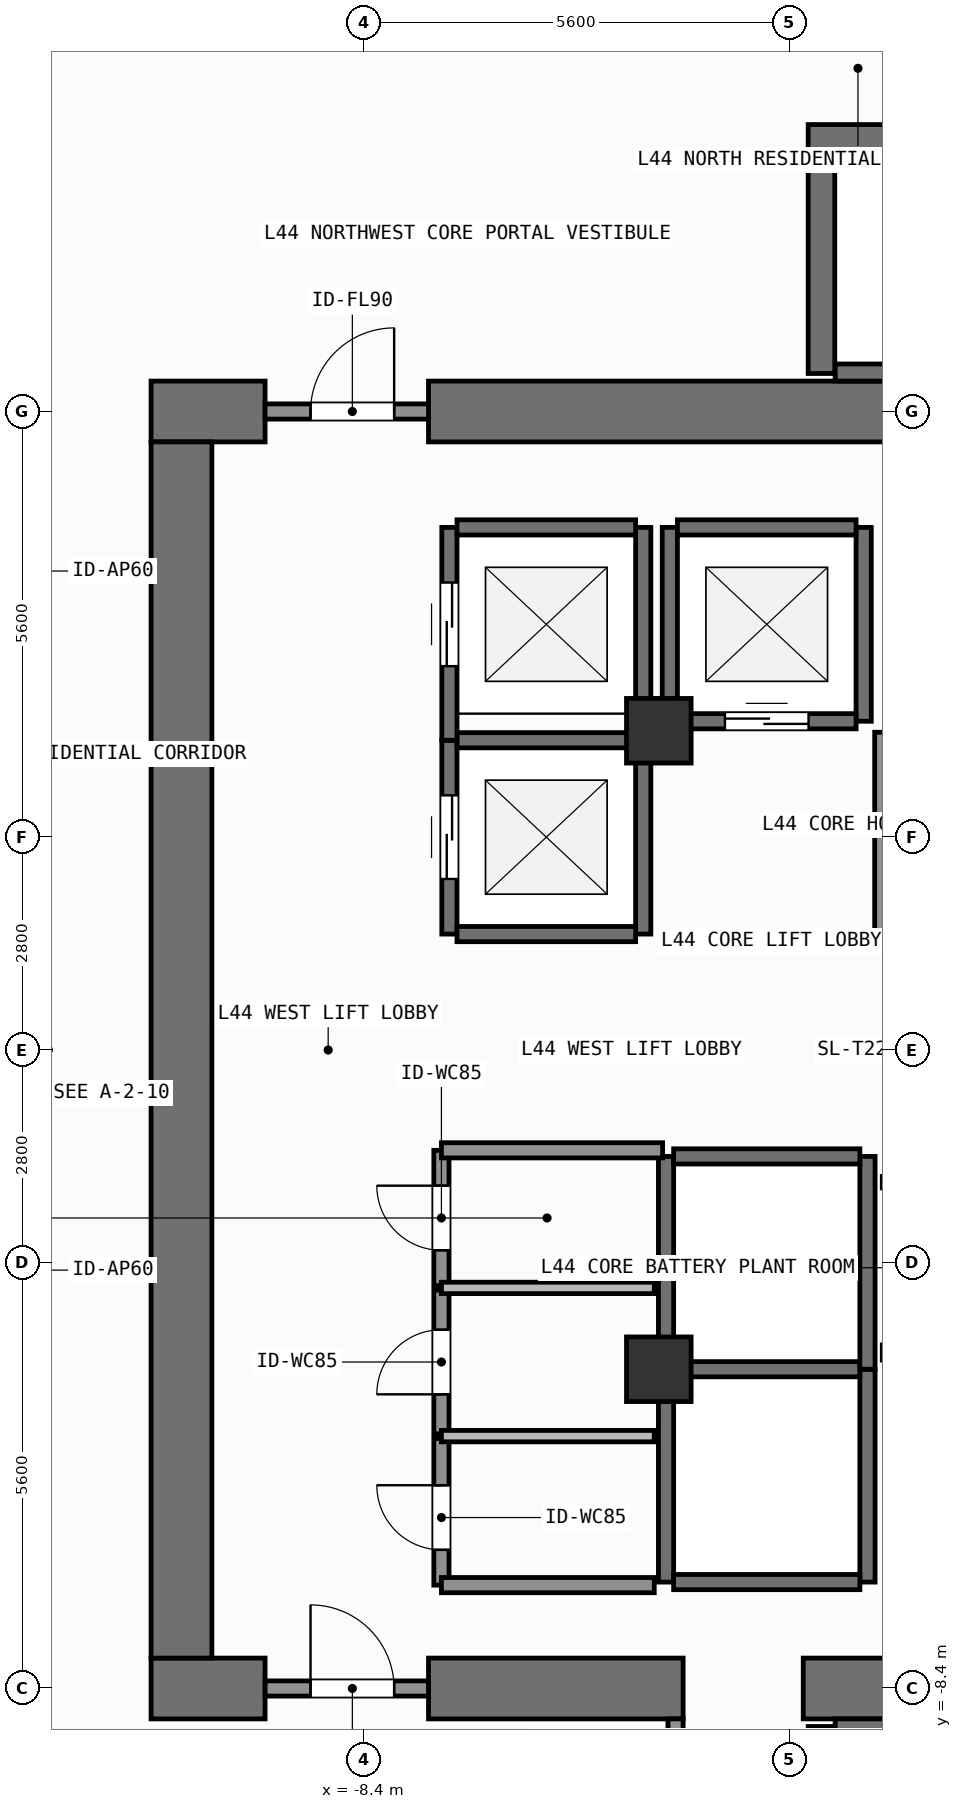
"""IFC4 building model, lengths in metres.
Left out: names, types, materials, properties, quantities, classifications, styles, units other than length and angle.
Written with IfcOpenShell. Run it as: python <this file> out.ifc"""

import sys

from ifc_helpers import new_model, si_unit, direction, frame, frame_2d, origin, origin_2d, place, context, subcontext, project, spatial, rectangle, extrude, element, fill, save


model = new_model("IFC4")
c1 = context("Model", 3, precision=1e-05, world=origin(), true_north=direction((0.0, 1.0)))
c2 = subcontext(c1, "Body", "Model", "MODEL_VIEW")
j1 = project(units=[si_unit("LENGTHUNIT", "METRE"), si_unit("PLANEANGLEUNIT", "RADIAN")], contexts=[c1])
p1 = place(None, origin())
s1 = spatial("IfcSite", under=j1, at=p1, CompositionType="ELEMENT")
p2 = place(p1, origin())
s2 = spatial("IfcBuilding", under=s1, at=p2, CompositionType="ELEMENT")
p3 = place(p2, frame((0.0, 0.0, 179.7)))
s3 = spatial("IfcBuildingStorey", under=s2, at=p3, CompositionType="ELEMENT", Elevation=179.7)
p4 = place(p3, frame((-11.2, -8.4, 0.0), z_axis=(0.0, 0.0, 1.0), x_axis=(1.0, 0.0, 0.0)))
e1 = element("IfcWall", 1, at=p4, inside=s3, PredefinedType="SHEAR", context=c2, shape_type="SweptSolid", body=[
    extrude(rectangle(XDim=1.5, YDim=0.8, at=frame_2d((0.75, 0.0))), origin(), (0.0, 0.0, 1.0), 3.9),
])
p5 = place(p3, frame((-7.55, -8.4, 0.0), z_axis=(0.0, 0.0, 1.0), x_axis=(1.0, 0.0, 0.0)))
e2 = element("IfcWall", 2, at=p5, inside=s3, PredefinedType="SHEAR", context=c2, shape_type="SweptSolid", body=[
    extrude(rectangle(XDim=3.35, YDim=0.8, at=frame_2d((1.675, 0.0))), origin(), (0.0, 0.0, 1.0), 3.9),
])
p6 = place(p3, frame((-2.62, -8.4, 0.0), z_axis=(0.0, 0.0, 1.0), x_axis=(1.0, 0.0, 0.0)))
e3 = element("IfcWall", 3, at=p6, inside=s3, PredefinedType="SHEAR", context=c2, shape_type="SweptSolid", body=[
    extrude(rectangle(XDim=7.27, YDim=0.8, at=frame_2d((3.635, 0.0))), origin(), (0.0, 0.0, 1.0), 3.9),
])
p7 = place(p3, frame((-11.2, 8.4, 0.0), z_axis=(0.0, 0.0, 1.0), x_axis=(1.0, 0.0, 0.0)))
e4 = element("IfcWall", 4, at=p7, inside=s3, PredefinedType="SHEAR", context=c2, shape_type="SweptSolid", body=[
    extrude(rectangle(XDim=1.5, YDim=0.8, at=frame_2d((0.75, 0.0))), origin(), (0.0, 0.0, 1.0), 3.9),
])
p8 = place(p3, frame((-7.55, 8.4, 0.0), z_axis=(0.0, 0.0, 1.0), x_axis=(1.0, 0.0, 0.0)))
e5 = element("IfcWall", 5, at=p8, inside=s3, PredefinedType="SHEAR", context=c2, shape_type="SweptSolid", body=[
    extrude(rectangle(XDim=16.35, YDim=0.8, at=frame_2d((8.175, 0.0))), origin(), (0.0, 0.0, 1.0), 3.9),
])
p9 = place(p3, frame((-10.8, -8.0, 0.0), z_axis=(0.0, 0.0, 1.0), x_axis=(0.0, 1.0, 0.0)))
e6 = element("IfcWall", 6, at=p9, inside=s3, PredefinedType="SHEAR", context=c2, shape_type="SweptSolid", body=[
    extrude(rectangle(XDim=16.0, YDim=0.8, at=frame_2d((8.0, 0.0))), origin(), (0.0, 0.0, 1.0), 3.9),
])
p10 = place(p3, frame((-2.2, -8.913, 0.0), z_axis=(0.0, 0.0, 1.0), x_axis=(1.0, 0.0, 0.0)))
e7 = element("IfcWall", 7, at=p10, inside=s3, PredefinedType="SHEAR", context=c2, shape_type="SweptSolid", body=[
    extrude(rectangle(XDim=6.6, YDim=0.225, at=frame_2d((3.3, 0.0))), origin(), (0.0, 0.0, 1.0), 3.9),
])
p11 = place(p3, frame((-2.38, -11.825, 0.0), z_axis=(0.0, 0.0, 1.0), x_axis=(0.0, 1.0, 0.0)))
e8 = element("IfcWall", 8, at=p11, inside=s3, PredefinedType="SHEAR", context=c2, shape_type="SweptSolid", body=[
    extrude(rectangle(XDim=2.925, YDim=0.35, at=frame_2d((1.462, 0.0))), origin(), (0.0, 0.0, 1.0), 3.9),
])
p12 = place(p3, frame((-2.555, 12.0, 0.0), z_axis=(0.0, 0.0, 1.0), x_axis=(1.0, 0.0, 0.0)))
e9 = element("IfcWall", 9, at=p12, inside=s3, PredefinedType="SHEAR", context=c2, shape_type="SweptSolid", body=[
    extrude(rectangle(XDim=7.31, YDim=0.35, at=frame_2d((3.655, 0.0))), origin(), (0.0, 0.0, 1.0), 3.9),
])
p13 = place(p3, frame((-2.2, 8.913, 0.0), z_axis=(0.0, 0.0, 1.0), x_axis=(1.0, 0.0, 0.0)))
e10 = element("IfcWall", 10, at=p13, inside=s3, PredefinedType="SHEAR", context=c2, shape_type="SweptSolid", body=[
    extrude(rectangle(XDim=6.6, YDim=0.225, at=frame_2d((3.3, 0.0))), origin(), (0.0, 0.0, 1.0), 3.9),
])
p14 = place(p3, frame((-2.38, 8.9, 0.0), z_axis=(0.0, 0.0, 1.0), x_axis=(0.0, 1.0, 0.0)))
e11 = element("IfcWall", 11, at=p14, inside=s3, PredefinedType="SHEAR", context=c2, shape_type="SweptSolid", body=[
    extrude(rectangle(XDim=2.925, YDim=0.35, at=frame_2d((1.462, 0.0))), origin(), (0.0, 0.0, 1.0), 3.9),
])
for number, where, z_axis, x_axis in (
    (12, (-4.52, -4.2, 0.0), (0.0, 0.0, 1.0), (1.0, 0.0, 0.0)),
    (13, (-4.52, 4.2, 0.0), (0.0, 0.0, 1.0), (1.0, 0.0, 0.0)),
):
    element("IfcColumn", number, at=place(p3, frame(where, z_axis=z_axis, x_axis=x_axis)), inside=s3, PredefinedType="COLUMN", context=c2, shape_type="SweptSolid", body=[
        extrude(rectangle(XDim=0.85, YDim=0.85, at=origin_2d()), origin(), (0.0, 0.0, 1.0), 3.9),
    ])
p15 = place(p3, frame((-7.275, 1.525, 0.0), z_axis=(0.0, 0.0, 1.0), x_axis=(0.0, 1.0, 0.0)))
e14 = element("IfcWall", 14, at=p15, inside=s3, PredefinedType="SHEAR", context=c2, shape_type="SweptSolid", body=[
    extrude(rectangle(XDim=2.55, YDim=0.2, at=frame_2d((1.275, 0.0))), origin(), (0.0, 0.0, 1.0), 3.68),
])
p16 = place(p15, frame((0.725, 0.0, 0.0)))
e15 = element("IfcOpeningElement", 15, at=p16, cuts=e14, PredefinedType="OPENING", context=c2, shape_type="SweptSolid", body=[
    extrude(rectangle(XDim=1.1, YDim=2.2, at=frame_2d((0.55, 1.1))), frame((0.0, 0.11, 0.0), z_axis=(0.0, -1.0, 0.0), x_axis=(1.0, 0.0, 0.0)), (0.0, 0.0, 1.0), 0.22),
])
p17 = place(p3, frame((-4.725, 1.525, 0.0), z_axis=(0.0, 0.0, 1.0), x_axis=(0.0, 1.0, 0.0)))
e16 = element("IfcWall", 16, at=p17, inside=s3, PredefinedType="SHEAR", context=c2, shape_type="SweptSolid", body=[
    extrude(rectangle(XDim=2.55, YDim=0.2, at=frame_2d((1.275, 0.0))), origin(), (0.0, 0.0, 1.0), 3.68),
])
for number, where, z_axis, x_axis in (
    (17, (-7.175, 1.525, 0.0), (0.0, 0.0, 1.0), (1.0, 0.0, 0.0)),
    (18, (-7.175, 4.075, 0.0), (0.0, 0.0, 1.0), (1.0, 0.0, 0.0)),
):
    element("IfcWall", number, at=place(p3, frame(where, z_axis=z_axis, x_axis=x_axis)), inside=s3, PredefinedType="SHEAR", context=c2, shape_type="SweptSolid", body=[
        extrude(rectangle(XDim=2.35, YDim=0.2, at=frame_2d((1.175, 0.0))), origin(), (0.0, 0.0, 1.0), 3.68),
    ])
p18 = place(p3, frame((-7.275, 4.075, 0.0), z_axis=(0.0, 0.0, 1.0), x_axis=(0.0, 1.0, 0.0)))
e19 = element("IfcWall", 19, at=p18, inside=s3, PredefinedType="SHEAR", context=c2, shape_type="SweptSolid", body=[
    extrude(rectangle(XDim=2.8, YDim=0.2, at=frame_2d((1.4, 0.0))), origin(), (0.0, 0.0, 1.0), 3.68),
])
p19 = place(p18, frame((0.975, 0.0, 0.0)))
e20 = element("IfcOpeningElement", 20, at=p19, cuts=e19, PredefinedType="OPENING", context=c2, shape_type="SweptSolid", body=[
    extrude(rectangle(XDim=1.1, YDim=2.2, at=frame_2d((0.55, 1.1))), frame((0.0, 0.11, 0.0), z_axis=(0.0, -1.0, 0.0), x_axis=(1.0, 0.0, 0.0)), (0.0, 0.0, 1.0), 0.22),
])
p20 = place(p3, frame((-4.725, 4.075, 0.0), z_axis=(0.0, 0.0, 1.0), x_axis=(0.0, 1.0, 0.0)))
e21 = element("IfcWall", 21, at=p20, inside=s3, PredefinedType="SHEAR", context=c2, shape_type="SweptSolid", body=[
    extrude(rectangle(XDim=2.8, YDim=0.2, at=frame_2d((1.4, 0.0))), origin(), (0.0, 0.0, 1.0), 3.68),
])
p21 = place(p3, frame((-7.175, 6.875, 0.0), z_axis=(0.0, 0.0, 1.0), x_axis=(1.0, 0.0, 0.0)))
e22 = element("IfcWall", 22, at=p21, inside=s3, PredefinedType="SHEAR", context=c2, shape_type="SweptSolid", body=[
    extrude(rectangle(XDim=2.35, YDim=0.2, at=frame_2d((1.175, 0.0))), origin(), (0.0, 0.0, 1.0), 3.68),
])
for number, where, z_axis, x_axis in (
    (23, (-4.375, 4.325, 0.0), (0.0, 0.0, 1.0), (0.0, 1.0, 0.0)),
    (24, (-1.825, 4.325, 0.0), (0.0, 0.0, 1.0), (0.0, 1.0, 0.0)),
):
    element("IfcWall", number, at=place(p3, frame(where, z_axis=z_axis, x_axis=x_axis)), inside=s3, PredefinedType="SHEAR", context=c2, shape_type="SweptSolid", body=[
        extrude(rectangle(XDim=2.55, YDim=0.2, at=frame_2d((1.275, 0.0))), origin(), (0.0, 0.0, 1.0), 3.68),
    ])
p22 = place(p3, frame((-4.275, 4.325, 0.0), z_axis=(0.0, 0.0, 1.0), x_axis=(1.0, 0.0, 0.0)))
e25 = element("IfcWall", 25, at=p22, inside=s3, PredefinedType="SHEAR", context=c2, shape_type="SweptSolid", body=[
    extrude(rectangle(XDim=2.35, YDim=0.2, at=frame_2d((1.175, 0.0))), origin(), (0.0, 0.0, 1.0), 3.68),
])
p23 = place(p22, frame((0.625, 0.0, 0.0)))
e26 = element("IfcOpeningElement", 26, at=p23, cuts=e25, PredefinedType="OPENING", context=c2, shape_type="SweptSolid", body=[
    extrude(rectangle(XDim=1.1, YDim=2.2, at=frame_2d((0.55, 1.1))), frame((0.0, 0.11, 0.0), z_axis=(0.0, -1.0, 0.0), x_axis=(1.0, 0.0, 0.0)), (0.0, 0.0, 1.0), 0.22),
])
p24 = place(p3, frame((-4.275, 6.875, 0.0), z_axis=(0.0, 0.0, 1.0), x_axis=(1.0, 0.0, 0.0)))
e27 = element("IfcWall", 27, at=p24, inside=s3, PredefinedType="SHEAR", context=c2, shape_type="SweptSolid", body=[
    extrude(rectangle(XDim=2.35, YDim=0.2, at=frame_2d((1.175, 0.0))), origin(), (0.0, 0.0, 1.0), 3.68),
])
for number, where, z_axis, x_axis in (
    (28, (-4.425, -7.0, 0.0), (0.0, 0.0, 1.0), (0.0, 1.0, 0.0)),
    (29, (-1.775, -7.0, 0.0), (0.0, 0.0, 1.0), (0.0, 1.0, 0.0)),
):
    element("IfcWall", number, at=place(p3, frame(where, z_axis=z_axis, x_axis=x_axis)), inside=s3, PredefinedType="SHEAR", context=c2, shape_type="SweptSolid", body=[
        extrude(rectangle(XDim=2.8, YDim=0.2, at=frame_2d((1.4, 0.0))), origin(), (0.0, 0.0, 1.0), 3.68),
    ])
for number, where, z_axis, x_axis in (
    (30, (-4.325, -7.0, 0.0), (0.0, 0.0, 1.0), (1.0, 0.0, 0.0)),
    (31, (-4.325, -4.2, 0.0), (0.0, 0.0, 1.0), (1.0, 0.0, 0.0)),
):
    element("IfcWall", number, at=place(p3, frame(where, z_axis=z_axis, x_axis=x_axis)), inside=s3, PredefinedType="SHEAR", context=c2, shape_type="SweptSolid", body=[
        extrude(rectangle(XDim=2.45, YDim=0.2, at=frame_2d((1.225, 0.0))), origin(), (0.0, 0.0, 1.0), 3.68),
    ])
for number, where, z_axis, x_axis in (
    (32, (-4.425, -4.2, 0.0), (0.0, 0.0, 1.0), (0.0, 1.0, 0.0)),
    (33, (-1.775, -4.2, 0.0), (0.0, 0.0, 1.0), (0.0, 1.0, 0.0)),
):
    element("IfcWall", number, at=place(p3, frame(where, z_axis=z_axis, x_axis=x_axis)), inside=s3, PredefinedType="SHEAR", context=c2, shape_type="SweptSolid", body=[
        extrude(rectangle(XDim=2.8, YDim=0.2, at=frame_2d((1.4, 0.0))), origin(), (0.0, 0.0, 1.0), 3.68),
    ])
p25 = place(p3, frame((-4.325, -1.4, 0.0), z_axis=(0.0, 0.0, 1.0), x_axis=(1.0, 0.0, 0.0)))
e34 = element("IfcWall", 34, at=p25, inside=s3, PredefinedType="SHEAR", context=c2, shape_type="SweptSolid", body=[
    extrude(rectangle(XDim=2.45, YDim=0.2, at=frame_2d((1.225, 0.0))), origin(), (0.0, 0.0, 1.0), 3.68),
])
p26 = place(p3, frame((-9.7, -8.4, 0.0), z_axis=(0.0, 0.0, 1.0), x_axis=(1.0, 0.0, 0.0)))
e35 = element("IfcWall", 35, at=p26, inside=s3, PredefinedType="SOLIDWALL", context=c2, shape_type="SweptSolid", body=[
    extrude(rectangle(XDim=2.15, YDim=0.2, at=frame_2d((1.075, 0.0))), origin(), (0.0, 0.0, 1.0), 2.82),
])
p27 = place(p26, frame((0.598, 0.0, 0.0)))
e36 = element("IfcOpeningElement", 36, at=p27, cuts=e35, PredefinedType="OPENING", context=c2, shape_type="SweptSolid", body=[
    extrude(rectangle(XDim=1.1, YDim=2.15, at=frame_2d((0.55, 1.075))), frame((0.0, 0.11, 0.0), z_axis=(0.0, -1.0, 0.0), x_axis=(1.0, 0.0, 0.0)), (0.0, 0.0, 1.0), 0.22),
])
p28 = place(p3, frame((-9.7, 8.4, 0.0), z_axis=(0.0, 0.0, 1.0), x_axis=(1.0, 0.0, 0.0)))
e37 = element("IfcWall", 37, at=p28, inside=s3, PredefinedType="SOLIDWALL", context=c2, shape_type="SweptSolid", body=[
    extrude(rectangle(XDim=2.15, YDim=0.2, at=frame_2d((1.075, 0.0))), origin(), (0.0, 0.0, 1.0), 2.82),
])
p29 = place(p28, frame((0.598, 0.0, 0.0)))
e38 = element("IfcOpeningElement", 38, at=p29, cuts=e37, PredefinedType="OPENING", context=c2, shape_type="SweptSolid", body=[
    extrude(rectangle(XDim=1.1, YDim=2.15, at=frame_2d((0.55, 1.075))), frame((0.0, 0.11, 0.0), z_axis=(0.0, -1.0, 0.0), x_axis=(1.0, 0.0, 0.0)), (0.0, 0.0, 1.0), 0.22),
])
p30 = place(p3, frame((-7.38, -7.04, 0.0), z_axis=(0.0, 0.0, 1.0), x_axis=(0.0, 1.0, 0.0)))
e39 = element("IfcWall", 39, at=p30, inside=s3, PredefinedType="SOLIDWALL", context=c2, shape_type="SweptSolid", body=[
    extrude(rectangle(XDim=1.93, YDim=0.2, at=frame_2d((0.965, 0.0))), origin(), (0.0, 0.0, 1.0), 3.68),
])
p31 = place(p30, frame((0.464, 0.0, 0.0)))
e40 = element("IfcOpeningElement", 40, at=p31, cuts=e39, PredefinedType="OPENING", context=c2, shape_type="SweptSolid", body=[
    extrude(rectangle(XDim=0.85, YDim=2.1, at=frame_2d((0.425, 1.05))), frame((0.0, 0.11, 0.0), z_axis=(0.0, -1.0, 0.0), x_axis=(1.0, 0.0, 0.0)), (0.0, 0.0, 1.0), 0.22),
])
p32 = place(p3, frame((-7.38, -5.05, 0.0), z_axis=(0.0, 0.0, 1.0), x_axis=(0.0, 1.0, 0.0)))
e41 = element("IfcWall", 41, at=p32, inside=s3, PredefinedType="SOLIDWALL", context=c2, shape_type="SweptSolid", body=[
    extrude(rectangle(XDim=1.89, YDim=0.2, at=frame_2d((0.945, 0.0))), origin(), (0.0, 0.0, 1.0), 3.68),
])
p33 = place(p32, frame((0.52, 0.0, 0.0)))
e42 = element("IfcOpeningElement", 42, at=p33, cuts=e41, PredefinedType="OPENING", context=c2, shape_type="SweptSolid", body=[
    extrude(rectangle(XDim=0.85, YDim=2.1, at=frame_2d((0.425, 1.05))), frame((0.0, 0.11, 0.0), z_axis=(0.0, -1.0, 0.0), x_axis=(1.0, 0.0, 0.0)), (0.0, 0.0, 1.0), 0.22),
])
p34 = place(p3, frame((-7.38, -3.1, 0.0), z_axis=(0.0, 0.0, 1.0), x_axis=(0.0, 1.0, 0.0)))
e43 = element("IfcWall", 43, at=p34, inside=s3, PredefinedType="SOLIDWALL", context=c2, shape_type="SweptSolid", body=[
    extrude(rectangle(XDim=1.78, YDim=0.2, at=frame_2d((0.89, 0.0))), origin(), (0.0, 0.0, 1.0), 3.68),
])
p35 = place(p34, frame((0.465, 0.0, 0.0)))
e44 = element("IfcOpeningElement", 44, at=p35, cuts=e43, PredefinedType="OPENING", context=c2, shape_type="SweptSolid", body=[
    extrude(rectangle(XDim=0.85, YDim=2.1, at=frame_2d((0.425, 1.05))), frame((0.0, 0.11, 0.0), z_axis=(0.0, -1.0, 0.0), x_axis=(1.0, 0.0, 0.0)), (0.0, 0.0, 1.0), 0.22),
])
p36 = place(p3, frame((-4.3, -12.06, 0.0), z_axis=(0.0, 0.0, 1.0), x_axis=(0.0, 1.0, 0.0)))
e45 = element("IfcWall", 45, at=p36, inside=s3, PredefinedType="SOLIDWALL", context=c2, shape_type="SweptSolid", body=[
    extrude(rectangle(XDim=3.26, YDim=0.2, at=frame_2d((1.63, 0.0))), origin(), (0.0, 0.0, 1.0), 3.68),
])
p37 = place(p3, frame((-7.38, -1.32, 0.0), z_axis=(0.0, 0.0, 1.0), x_axis=(1.0, 0.0, 0.0)))
e46 = element("IfcWall", 46, at=p37, inside=s3, PredefinedType="SOLIDWALL", context=c2, shape_type="SweptSolid", body=[
    extrude(rectangle(XDim=2.91, YDim=0.2, at=frame_2d((1.455, 0.0))), origin(), (0.0, 0.0, 1.0), 3.68),
])
p38 = place(p3, frame((-1.58, 1.48, 0.0), z_axis=(0.0, 0.0, 1.0), x_axis=(0.0, 1.0, 0.0)))
e47 = element("IfcWall", 47, at=p38, inside=s3, PredefinedType="SOLIDWALL", context=c2, shape_type="SweptSolid", body=[
    extrude(rectangle(XDim=2.7, YDim=0.2, at=frame_2d((1.35, 0.0))), origin(), (0.0, 0.0, 1.0), 3.68),
])
p39 = place(p3, frame((-7.38, -7.04, 0.0), z_axis=(0.0, 0.0, 1.0), x_axis=(1.0, 0.0, 0.0)))
e48 = element("IfcWall", 48, at=p39, inside=s3, PredefinedType="SOLIDWALL", context=c2, shape_type="SweptSolid", body=[
    extrude(rectangle(XDim=2.8, YDim=0.2, at=frame_2d((1.4, 0.0))), origin(), (0.0, 0.0, 1.0), 3.68),
])
for number, where, z_axis, x_axis in (
    (49, (-7.38, -5.08, 0.0), (0.0, 0.0, 1.0), (1.0, 0.0, 0.0)),
    (50, (-7.38, -3.13, 0.0), (0.0, 0.0, 1.0), (1.0, 0.0, 0.0)),
):
    element("IfcWall", number, at=place(p3, frame(where, z_axis=z_axis, x_axis=x_axis)), inside=s3, PredefinedType="PARTITIONING", context=c2, shape_type="SweptSolid", body=[
        extrude(rectangle(XDim=2.8, YDim=0.15, at=frame_2d((1.4, 0.0))), origin(), (0.0, 0.0, 1.0), 3.68),
    ])
p40 = place(p16, origin())
e51 = element("IfcDoor", 51, at=p40, inside=s3, OperationType="SLIDING_TO_LEFT", PredefinedType="DOOR", context=c2, shape_type="SweptSolid", body=[
    extrude(rectangle(XDim=1.1, YDim=2.2, at=frame_2d((0.55, 1.1))), frame((0.0, 0.025, 0.0), z_axis=(0.0, -1.0, 0.0), x_axis=(1.0, 0.0, 0.0)), (0.0, 0.0, 1.0), 0.05),
])
fill(e15, e51)
p41 = place(p19, origin())
e52 = element("IfcDoor", 52, at=p41, inside=s3, OperationType="SLIDING_TO_LEFT", PredefinedType="DOOR", context=c2, shape_type="SweptSolid", body=[
    extrude(rectangle(XDim=1.1, YDim=2.2, at=frame_2d((0.55, 1.1))), frame((0.0, 0.025, 0.0), z_axis=(0.0, -1.0, 0.0), x_axis=(1.0, 0.0, 0.0)), (0.0, 0.0, 1.0), 0.05),
])
fill(e20, e52)
p42 = place(p23, origin())
e53 = element("IfcDoor", 53, at=p42, inside=s3, OperationType="SLIDING_TO_LEFT", PredefinedType="DOOR", context=c2, shape_type="SweptSolid", body=[
    extrude(rectangle(XDim=1.1, YDim=2.2, at=frame_2d((0.55, 1.1))), frame((0.0, 0.025, 0.0), z_axis=(0.0, -1.0, 0.0), x_axis=(1.0, 0.0, 0.0)), (0.0, 0.0, 1.0), 0.05),
])
fill(e26, e53)
p43 = place(p27, origin())
e54 = element("IfcDoor", 54, at=p43, inside=s3, OperationType="SINGLE_SWING_LEFT", PredefinedType="DOOR", context=c2, shape_type="SweptSolid", body=[
    extrude(rectangle(XDim=1.1, YDim=2.15, at=frame_2d((0.55, 1.075))), frame((0.0, 0.025, 0.0), z_axis=(0.0, -1.0, 0.0), x_axis=(1.0, 0.0, 0.0)), (0.0, 0.0, 1.0), 0.05),
])
fill(e36, e54)
p44 = place(p29, origin())
e55 = element("IfcDoor", 55, at=p44, inside=s3, OperationType="SINGLE_SWING_RIGHT", PredefinedType="DOOR", context=c2, shape_type="SweptSolid", body=[
    extrude(rectangle(XDim=1.1, YDim=2.15, at=frame_2d((0.55, 1.075))), frame((0.0, 0.025, 0.0), z_axis=(0.0, -1.0, 0.0), x_axis=(1.0, 0.0, 0.0)), (0.0, 0.0, 1.0), 0.05),
])
fill(e38, e55)
p45 = place(p31, origin())
e56 = element("IfcDoor", 56, at=p45, inside=s3, OperationType="SINGLE_SWING_RIGHT", PredefinedType="DOOR", context=c2, shape_type="SweptSolid", body=[
    extrude(rectangle(XDim=0.85, YDim=2.1, at=frame_2d((0.425, 1.05))), frame((0.0, 0.025, 0.0), z_axis=(0.0, -1.0, 0.0), x_axis=(1.0, 0.0, 0.0)), (0.0, 0.0, 1.0), 0.05),
])
fill(e40, e56)
p46 = place(p33, origin())
e57 = element("IfcDoor", 57, at=p46, inside=s3, OperationType="SINGLE_SWING_LEFT", PredefinedType="DOOR", context=c2, shape_type="SweptSolid", body=[
    extrude(rectangle(XDim=0.85, YDim=2.1, at=frame_2d((0.425, 1.05))), frame((0.0, 0.025, 0.0), z_axis=(0.0, -1.0, 0.0), x_axis=(1.0, 0.0, 0.0)), (0.0, 0.0, 1.0), 0.05),
])
fill(e42, e57)
p47 = place(p35, origin())
e58 = element("IfcDoor", 58, at=p47, inside=s3, OperationType="SINGLE_SWING_RIGHT", PredefinedType="DOOR", context=c2, shape_type="SweptSolid", body=[
    extrude(rectangle(XDim=0.85, YDim=2.1, at=frame_2d((0.425, 1.05))), frame((0.0, 0.025, 0.0), z_axis=(0.0, -1.0, 0.0), x_axis=(1.0, 0.0, 0.0)), (0.0, 0.0, 1.0), 0.05),
])
fill(e44, e58)
save(model, sys.argv[1])
